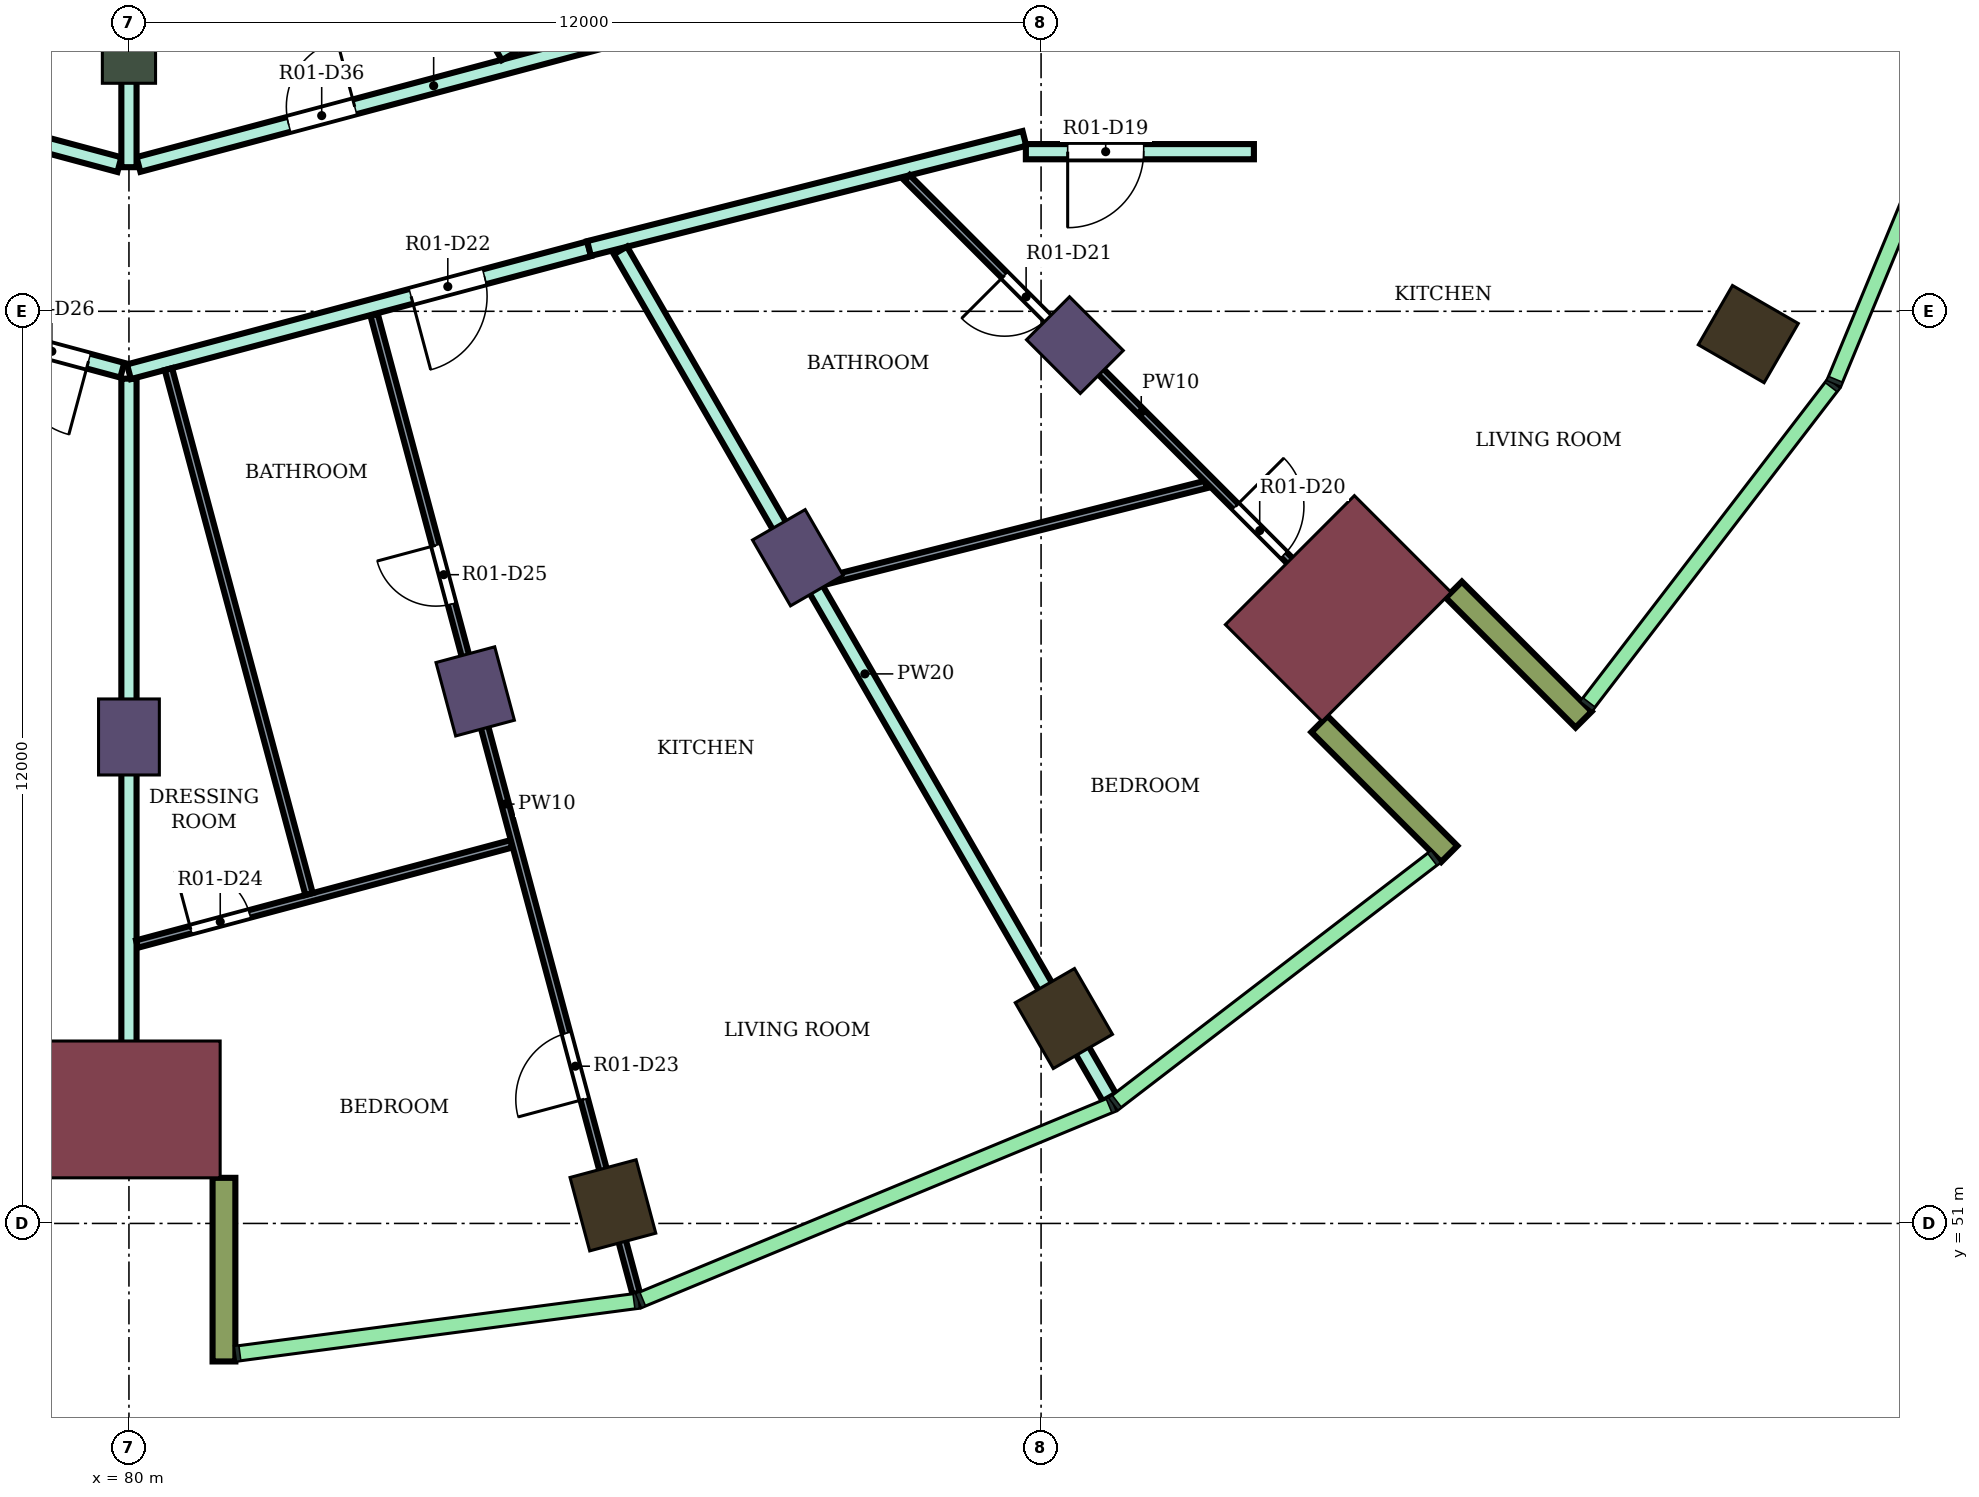
"""IFC4 building model, lengths in metres.
Left out: names, types, materials, properties, quantities, classifications, styles, units other than length and angle.
Written with IfcOpenShell. Run it as: python <this file> out.ifc"""

import sys

from ifc_helpers import new_model, si_unit, direction, frame, frame_2d, origin, origin_2d, place, context, subcontext, project, spatial, rectangle, extrude, element, fill, save


model = new_model("IFC4")
c1 = context("Model", 3, precision=1e-05, world=origin(), true_north=direction((0.0, 1.0)))
c2 = subcontext(c1, "Body", "Model", "MODEL_VIEW")
j1 = project(units=[si_unit("LENGTHUNIT", "METRE"), si_unit("PLANEANGLEUNIT", "RADIAN")], contexts=[c1])
p1 = place(None, origin())
s1 = spatial("IfcSite", under=j1, at=p1, CompositionType="ELEMENT")
p2 = place(p1, origin())
s2 = spatial("IfcBuilding", under=s1, at=p2, CompositionType="ELEMENT")
p3 = place(p2, frame((0.0, 0.0, 161.8)))
s3 = spatial("IfcBuildingStorey", under=s2, at=p3, CompositionType="ELEMENT", Elevation=161.8)
for number, where, z_axis, x_axis in (
    (1, (86.367, 51.238, 0.0), (0.0, 0.0, 1.0), (0.259, -0.966, 0.0)),
    (2, (92.3, 53.696, 0.0), (0.0, 0.0, 1.0), (0.5, -0.866, 0.0)),
    (3, (101.304, 62.7, 0.0), (0.0, 0.0, 1.0), (0.866, -0.5, 0.0)),
):
    element("IfcColumn", number, at=place(p3, frame(where, z_axis=z_axis, x_axis=x_axis)), inside=s3, PredefinedType="COLUMN", context=c2, shape_type="SweptSolid", body=[
        extrude(rectangle(XDim=1.0, YDim=0.9, at=origin_2d()), origin(), (0.0, 0.0, 1.0), 4.1),
    ])
for number, where, z_axis, x_axis in (
    (4, (80.0, 57.4, 0.0), (0.0, 0.0, 1.0), (0.0, -1.0, 0.0)),
    (5, (84.555, 58.0, 0.0), (0.0, 0.0, 1.0), (0.259, -0.966, 0.0)),
    (6, (88.8, 59.758, 0.0), (0.0, 0.0, 1.0), (0.5, -0.866, 0.0)),
    (7, (92.445, 62.555, 0.0), (0.0, 0.0, 1.0), (0.707, -0.707, 0.0)),
):
    element("IfcColumn", number, at=place(p3, frame(where, z_axis=z_axis, x_axis=x_axis)), inside=s3, PredefinedType="COLUMN", context=c2, shape_type="SweptSolid", body=[
        extrude(rectangle(XDim=1.0, YDim=0.8, at=origin_2d()), origin(), (0.0, 0.0, 1.0), 4.1),
    ])
p4 = place(p3, frame((80.0, 66.4, 0.0), z_axis=(0.0, 0.0, 1.0), x_axis=(0.0, -1.0, 0.0)))
e8 = element("IfcColumn", 8, at=p4, inside=s3, PredefinedType="COLUMN", context=c2, shape_type="SweptSolid", body=[
    extrude(rectangle(XDim=0.8, YDim=0.7, at=origin_2d()), origin(), (0.0, 0.0, 1.0), 4.1),
])
for number, where, z_axis, x_axis in (
    (9, (80.0, 52.5, 0.0), (0.0, 0.0, 1.0), (0.0, -1.0, 0.0)),
    (10, (95.91, 59.09, 0.0), (0.0, 0.0, 1.0), (0.707, -0.707, 0.0)),
):
    element("IfcColumn", number, at=place(p3, frame(where, z_axis=z_axis, x_axis=x_axis)), inside=s3, PredefinedType="COLUMN", context=c2, shape_type="SweptSolid", body=[
        extrude(rectangle(XDim=1.8, YDim=2.4, at=origin_2d()), origin(), (0.0, 0.0, 1.0), 4.1),
    ])
for number, where, z_axis, x_axis in (
    (11, (81.25, 51.6, 0.0), (0.0, 0.0, 1.0), (0.0, -1.0, 0.0)),
    (12, (95.662, 57.57, 0.0), (0.0, 0.0, 1.0), (0.707, -0.707, 0.0)),
    (13, (97.43, 59.338, 0.0), (0.0, 0.0, 1.0), (0.707, -0.707, 0.0)),
):
    element("IfcWall", number, at=place(p3, frame(where, z_axis=z_axis, x_axis=x_axis)), inside=s3, PredefinedType="NOTDEFINED", context=c2, shape_type="SweptSolid", body=[
        extrude(rectangle(XDim=2.416, YDim=0.3, at=frame_2d((1.208, 0.0))), origin(), (0.0, 0.0, 1.0), 4.1),
    ])
p5 = place(p3, frame((74.15, 63.772, 0.0), z_axis=(0.0, 0.0, 1.0), x_axis=(0.965807109237, -0.259261697417, 0.0)))
e14 = element("IfcWall", 14, at=p5, inside=s3, PredefinedType="PARTITIONING", context=c2, shape_type="SweptSolid", body=[
    extrude(rectangle(XDim=5.967, YDim=0.2, at=frame_2d((2.983, 0.0))), origin(), (0.0, 0.0, 1.0), 3.65),
])
p6 = place(p5, frame((4.507, 0.0, 0.0)))
e15 = element("IfcOpeningElement", 15, at=p6, cuts=e14, PredefinedType="OPENING", context=c2, shape_type="SweptSolid", body=[
    extrude(rectangle(XDim=1.0, YDim=2.1, at=frame_2d((0.5, 1.05))), frame((0.0, 0.11, 0.0), z_axis=(0.0, -1.0, 0.0), x_axis=(1.0, 0.0, 0.0)), (0.0, 0.0, 1.0), 0.22),
])
p7 = place(p3, frame((74.603, 66.342, 0.0), z_axis=(0.0, 0.0, 1.0), x_axis=(0.965920893652, -0.258837453254, 0.0)))
e16 = element("IfcWall", 16, at=p7, inside=s3, PredefinedType="PARTITIONING", context=c2, shape_type="SweptSolid", body=[
    extrude(rectangle(XDim=5.458, YDim=0.2, at=frame_2d((2.729, 0.0))), origin(), (0.0, 0.0, 1.0), 3.65),
])
p8 = place(p7, frame((2.512, 0.0, 0.0)))
e17 = element("IfcOpeningElement", 17, at=p8, cuts=e16, PredefinedType="OPENING", context=c2, shape_type="SweptSolid", body=[
    extrude(rectangle(XDim=0.9, YDim=2.1, at=frame_2d((0.45, 1.05))), frame((0.0, 0.11, 0.0), z_axis=(0.0, -1.0, 0.0), x_axis=(1.0, 0.0, 0.0)), (0.0, 0.0, 1.0), 0.22),
])
p9 = place(p3, frame((80.125, 64.932, 0.0), z_axis=(0.0, 0.0, 1.0), x_axis=(0.966236955806, 0.257655089674, 0.0)))
e18 = element("IfcWall", 18, at=p9, inside=s3, PredefinedType="PARTITIONING", context=c2, shape_type="SweptSolid", body=[
    extrude(rectangle(XDim=8.039, YDim=0.2, at=frame_2d((4.02, 0.0))), origin(), (0.0, 0.0, 1.0), 3.65),
])
p10 = place(p9, frame((6.298, 0.0, 0.0)))
e19 = element("IfcOpeningElement", 19, at=p10, cuts=e18, PredefinedType="OPENING", context=c2, shape_type="SweptSolid", body=[
    extrude(rectangle(XDim=0.9, YDim=2.1, at=frame_2d((0.45, 1.05))), frame((0.0, 0.11, 0.0), z_axis=(0.0, -1.0, 0.0), x_axis=(1.0, 0.0, 0.0)), (0.0, 0.0, 1.0), 0.22),
])
p11 = place(p9, frame((2.045, 0.0, 0.0)))
e20 = element("IfcOpeningElement", 20, at=p11, cuts=e18, PredefinedType="OPENING", context=c2, shape_type="SweptSolid", body=[
    extrude(rectangle(XDim=0.9, YDim=2.1, at=frame_2d((0.45, 1.05))), frame((0.0, 0.11, 0.0), z_axis=(0.0, -1.0, 0.0), x_axis=(1.0, 0.0, 0.0)), (0.0, 0.0, 1.0), 0.22),
])
p12 = place(p3, frame((80.0, 51.8, 0.0), z_axis=(0.0, 0.0, 1.0), x_axis=(0.0, 1.0, 0.0)))
e21 = element("IfcWall", 21, at=p12, inside=s3, PredefinedType="PARTITIONING", context=c2, shape_type="SweptSolid", body=[
    extrude(rectangle(XDim=10.314, YDim=0.2, at=frame_2d((5.157, 0.0))), origin(), (0.0, 0.0, 1.0), 3.65),
])
p13 = place(p3, frame((80.0, 62.205, 0.0), z_axis=(0.0, 0.0, 1.0), x_axis=(0.966104192593, 0.258152453124, 0.0)))
e22 = element("IfcWall", 22, at=p13, inside=s3, PredefinedType="PARTITIONING", context=c2, shape_type="SweptSolid", body=[
    extrude(rectangle(XDim=6.266, YDim=0.2, at=frame_2d((3.133, 0.0))), origin(), (0.0, 0.0, 1.0), 3.65),
])
p14 = place(p13, frame((3.842, 0.0, 0.0)))
e23 = element("IfcOpeningElement", 23, at=p14, cuts=e22, PredefinedType="OPENING", context=c2, shape_type="SweptSolid", body=[
    extrude(rectangle(XDim=1.0, YDim=2.1, at=frame_2d((0.5, 1.05))), frame((0.0, 0.11, 0.0), z_axis=(0.0, -1.0, 0.0), x_axis=(1.0, 0.0, 0.0)), (0.0, 0.0, 1.0), 0.22),
])
p15 = place(p3, frame((80.0, 64.896, 0.0), z_axis=(0.0, 0.0, 1.0), x_axis=(0.0, 1.0, 0.0)))
e24 = element("IfcWall", 24, at=p15, inside=s3, PredefinedType="PARTITIONING", context=c2, shape_type="SweptSolid", body=[
    extrude(rectangle(XDim=2.405, YDim=0.2, at=frame_2d((1.203, 0.0))), origin(), (0.0, 0.0, 1.0), 3.65),
])
p16 = place(p3, frame((83.85, 68.333, 0.0), z_axis=(0.0, 0.0, 1.0), x_axis=(0.499953638813, -0.866052168773, 0.0)))
e25 = element("IfcWall", 25, at=p16, inside=s3, PredefinedType="PARTITIONING", context=c2, shape_type="SweptSolid", body=[
    extrude(rectangle(XDim=2.285, YDim=0.2, at=frame_2d((1.143, 0.0))), origin(), (0.0, 0.0, 1.0), 3.65),
])
p17 = place(p3, frame((86.053, 63.826, 0.0), z_axis=(0.0, 0.0, 1.0), x_axis=(0.969490004987, 0.245130843083, 0.0)))
e26 = element("IfcWall", 26, at=p17, inside=s3, PredefinedType="PARTITIONING", context=c2, shape_type="SweptSolid", body=[
    extrude(rectangle(XDim=5.908, YDim=0.2, at=frame_2d((2.954, 0.0))), origin(), (0.0, 0.0, 1.0), 3.65),
])
p18 = place(p3, frame((86.466, 63.801, 0.0), z_axis=(0.0, 0.0, 1.0), x_axis=(0.499951314491, -0.866053510551, 0.0)))
e27 = element("IfcWall", 27, at=p18, inside=s3, PredefinedType="PARTITIONING", context=c2, shape_type="SweptSolid", body=[
    extrude(rectangle(XDim=12.866, YDim=0.2, at=frame_2d((6.433, 0.0))), origin(), (0.0, 0.0, 1.0), 3.65),
])
p19 = place(p3, frame((91.8, 65.1, 0.0), z_axis=(0.0, 0.0, 1.0), x_axis=(1.0, 0.0, 0.0)))
e28 = element("IfcWall", 28, at=p19, inside=s3, PredefinedType="PARTITIONING", context=c2, shape_type="SweptSolid", body=[
    extrude(rectangle(XDim=3.0, YDim=0.2, at=frame_2d((1.5, 0.0))), origin(), (0.0, 0.0, 1.0), 3.65),
])
p20 = place(p19, frame((0.55, 0.0, 0.0)))
e29 = element("IfcOpeningElement", 29, at=p20, cuts=e28, PredefinedType="OPENING", context=c2, shape_type="SweptSolid", body=[
    extrude(rectangle(XDim=1.0, YDim=2.1, at=frame_2d((0.5, 1.05))), frame((0.0, 0.11, 0.0), z_axis=(0.0, -1.0, 0.0), x_axis=(1.0, 0.0, 0.0)), (0.0, 0.0, 1.0), 0.22),
])
p21 = place(p3, frame((80.106, 54.676, 0.0), z_axis=(0.0, 0.0, 1.0), x_axis=(0.965976901679, 0.258628353863, 0.0)))
e30 = element("IfcWall", 30, at=p21, inside=s3, PredefinedType="PARTITIONING", context=c2, shape_type="SweptSolid", body=[
    extrude(rectangle(XDim=5.097, YDim=0.1, at=frame_2d((2.549, 0.0))), origin(), (0.0, 0.0, 1.0), 3.65),
])
p22 = place(p21, frame((0.733, 0.0, 0.0)))
e31 = element("IfcOpeningElement", 31, at=p22, cuts=e30, PredefinedType="OPENING", context=c2, shape_type="SweptSolid", body=[
    extrude(rectangle(XDim=0.8, YDim=2.1, at=frame_2d((0.4, 1.05))), frame((0.0, 0.06, 0.0), z_axis=(0.0, -1.0, 0.0), x_axis=(1.0, 0.0, 0.0)), (0.0, 0.0, 1.0), 0.12),
])
p23 = place(p3, frame((80.519, 62.239, 0.0), z_axis=(0.0, 0.0, 1.0), x_axis=(0.25878046533, -0.965936162882, 0.0)))
e32 = element("IfcWall", 32, at=p23, inside=s3, PredefinedType="PARTITIONING", context=c2, shape_type="SweptSolid", body=[
    extrude(rectangle(XDim=7.149, YDim=0.1, at=frame_2d((3.575, 0.0))), origin(), (0.0, 0.0, 1.0), 3.65),
])
p24 = place(p3, frame((83.225, 62.954, 0.0), z_axis=(0.0, 0.0, 1.0), x_axis=(0.258715941946, -0.965953446799, 0.0)))
e33 = element("IfcWall", 33, at=p24, inside=s3, PredefinedType="PARTITIONING", context=c2, shape_type="SweptSolid", body=[
    extrude(rectangle(XDim=13.328, YDim=0.1, at=frame_2d((6.664, 0.0))), origin(), (0.0, 0.0, 1.0), 3.65),
])
p25 = place(p24, frame((9.784, 0.0, 0.0)))
e34 = element("IfcOpeningElement", 34, at=p25, cuts=e33, PredefinedType="OPENING", context=c2, shape_type="SweptSolid", body=[
    extrude(rectangle(XDim=0.9, YDim=2.1, at=frame_2d((0.45, 1.05))), frame((0.0, 0.06, 0.0), z_axis=(0.0, -1.0, 0.0), x_axis=(1.0, 0.0, 0.0)), (0.0, 0.0, 1.0), 0.12),
])
p26 = place(p24, frame((3.14, 0.0, 0.0)))
e35 = element("IfcOpeningElement", 35, at=p26, cuts=e33, PredefinedType="OPENING", context=c2, shape_type="SweptSolid", body=[
    extrude(rectangle(XDim=0.8, YDim=2.1, at=frame_2d((0.4, 1.05))), frame((0.0, 0.06, 0.0), z_axis=(0.0, -1.0, 0.0), x_axis=(1.0, 0.0, 0.0)), (0.0, 0.0, 1.0), 0.12),
])
p27 = place(p3, frame((89.106, 59.441, 0.0), z_axis=(0.0, 0.0, 1.0), x_axis=(0.969462385749, 0.245240051009, 0.0)))
e36 = element("IfcWall", 36, at=p27, inside=s3, PredefinedType="PARTITIONING", context=c2, shape_type="SweptSolid", body=[
    extrude(rectangle(XDim=5.223, YDim=0.1, at=frame_2d((2.612, 0.0))), origin(), (0.0, 0.0, 1.0), 3.65),
])
p28 = place(p3, frame((90.236, 64.758, 0.0), z_axis=(0.0, 0.0, 1.0), x_axis=(0.706938769128, -0.707274753334, 0.0)))
e37 = element("IfcWall", 37, at=p28, inside=s3, PredefinedType="PARTITIONING", context=c2, shape_type="SweptSolid", body=[
    extrude(rectangle(XDim=8.72, YDim=0.1, at=frame_2d((4.36, 0.0))), origin(), (0.0, 0.0, 1.0), 3.65),
])
p29 = place(p28, frame((6.115, 0.0, 0.0)))
e38 = element("IfcOpeningElement", 38, at=p29, cuts=e37, PredefinedType="OPENING", context=c2, shape_type="SweptSolid", body=[
    extrude(rectangle(XDim=0.9, YDim=2.1, at=frame_2d((0.45, 1.05))), frame((0.0, 0.06, 0.0), z_axis=(0.0, -1.0, 0.0), x_axis=(1.0, 0.0, 0.0)), (0.0, 0.0, 1.0), 0.12),
])
p30 = place(p28, frame((1.817, 0.0, 0.0)))
e39 = element("IfcOpeningElement", 39, at=p30, cuts=e37, PredefinedType="OPENING", context=c2, shape_type="SweptSolid", body=[
    extrude(rectangle(XDim=0.8, YDim=2.1, at=frame_2d((0.4, 1.05))), frame((0.0, 0.06, 0.0), z_axis=(0.0, -1.0, 0.0), x_axis=(1.0, 0.0, 0.0)), (0.0, 0.0, 1.0), 0.12),
])
p31 = place(p20, frame((1.0, 0.0, 0.0), z_axis=(0.0, 0.0, 1.0), x_axis=(-1.0, 0.0, 0.0)))
e40 = element("IfcDoor", 40, at=p31, inside=s3, OperationType="SINGLE_SWING_RIGHT", PredefinedType="DOOR", context=c2, shape_type="SweptSolid", body=[
    extrude(rectangle(XDim=1.0, YDim=2.1, at=frame_2d((0.5, 1.05))), frame((0.0, 0.025, 0.0), z_axis=(0.0, -1.0, 0.0), x_axis=(1.0, 0.0, 0.0)), (0.0, 0.0, 1.0), 0.05),
])
fill(e29, e40)
p32 = place(p29, origin())
e41 = element("IfcDoor", 41, at=p32, inside=s3, OperationType="SINGLE_SWING_LEFT", PredefinedType="DOOR", context=c2, shape_type="SweptSolid", body=[
    extrude(rectangle(XDim=0.9, YDim=2.1, at=frame_2d((0.45, 1.05))), frame((0.0, 0.025, 0.0), z_axis=(0.0, -1.0, 0.0), x_axis=(1.0, 0.0, 0.0)), (0.0, 0.0, 1.0), 0.05),
])
fill(e38, e41)
p33 = place(p30, frame((0.8, 0.0, 0.0), z_axis=(0.0, 0.0, 1.0), x_axis=(-1.0, 0.0, 0.0)))
e42 = element("IfcDoor", 42, at=p33, inside=s3, OperationType="SINGLE_SWING_RIGHT", PredefinedType="DOOR", context=c2, shape_type="SweptSolid", body=[
    extrude(rectangle(XDim=0.8, YDim=2.1, at=frame_2d((0.4, 1.05))), frame((0.0, 0.025, 0.0), z_axis=(0.0, -1.0, 0.0), x_axis=(1.0, 0.0, 0.0)), (0.0, 0.0, 1.0), 0.05),
])
fill(e39, e42)
p34 = place(p14, frame((1.0, 0.0, 0.0), z_axis=(0.0, 0.0, 1.0), x_axis=(-1.0, 0.0, 0.0)))
e43 = element("IfcDoor", 43, at=p34, inside=s3, OperationType="SINGLE_SWING_RIGHT", PredefinedType="DOOR", context=c2, shape_type="SweptSolid", body=[
    extrude(rectangle(XDim=1.0, YDim=2.1, at=frame_2d((0.5, 1.05))), frame((0.0, 0.025, 0.0), z_axis=(0.0, -1.0, 0.0), x_axis=(1.0, 0.0, 0.0)), (0.0, 0.0, 1.0), 0.05),
])
fill(e23, e43)
p35 = place(p25, frame((0.9, 0.0, 0.0), z_axis=(0.0, 0.0, 1.0), x_axis=(-1.0, 0.0, 0.0)))
e44 = element("IfcDoor", 44, at=p35, inside=s3, OperationType="SINGLE_SWING_LEFT", PredefinedType="DOOR", context=c2, shape_type="SweptSolid", body=[
    extrude(rectangle(XDim=0.9, YDim=2.1, at=frame_2d((0.45, 1.05))), frame((0.0, 0.025, 0.0), z_axis=(0.0, -1.0, 0.0), x_axis=(1.0, 0.0, 0.0)), (0.0, 0.0, 1.0), 0.05),
])
fill(e34, e44)
p36 = place(p22, origin())
e45 = element("IfcDoor", 45, at=p36, inside=s3, OperationType="SINGLE_SWING_LEFT", PredefinedType="DOOR", context=c2, shape_type="SweptSolid", body=[
    extrude(rectangle(XDim=0.8, YDim=2.1, at=frame_2d((0.4, 1.05))), frame((0.0, 0.025, 0.0), z_axis=(0.0, -1.0, 0.0), x_axis=(1.0, 0.0, 0.0)), (0.0, 0.0, 1.0), 0.05),
])
fill(e31, e45)
p37 = place(p26, frame((0.8, 0.0, 0.0), z_axis=(0.0, 0.0, 1.0), x_axis=(-1.0, 0.0, 0.0)))
e46 = element("IfcDoor", 46, at=p37, inside=s3, OperationType="SINGLE_SWING_RIGHT", PredefinedType="DOOR", context=c2, shape_type="SweptSolid", body=[
    extrude(rectangle(XDim=0.8, YDim=2.1, at=frame_2d((0.4, 1.05))), frame((0.0, 0.025, 0.0), z_axis=(0.0, -1.0, 0.0), x_axis=(1.0, 0.0, 0.0)), (0.0, 0.0, 1.0), 0.05),
])
fill(e35, e46)
p38 = place(p6, frame((1.0, 0.0, 0.0), z_axis=(0.0, 0.0, 1.0), x_axis=(-1.0, 0.0, 0.0)))
e47 = element("IfcDoor", 47, at=p38, inside=s3, OperationType="SINGLE_SWING_LEFT", PredefinedType="DOOR", context=c2, shape_type="SweptSolid", body=[
    extrude(rectangle(XDim=1.0, YDim=2.1, at=frame_2d((0.5, 1.05))), frame((0.0, 0.025, 0.0), z_axis=(0.0, -1.0, 0.0), x_axis=(1.0, 0.0, 0.0)), (0.0, 0.0, 1.0), 0.05),
])
fill(e15, e47)
p39 = place(p11, origin())
e48 = element("IfcDoor", 48, at=p39, inside=s3, OperationType="SINGLE_SWING_RIGHT", PredefinedType="DOOR", context=c2, shape_type="SweptSolid", body=[
    extrude(rectangle(XDim=0.9, YDim=2.1, at=frame_2d((0.45, 1.05))), frame((0.0, 0.025, 0.0), z_axis=(0.0, -1.0, 0.0), x_axis=(1.0, 0.0, 0.0)), (0.0, 0.0, 1.0), 0.05),
])
fill(e20, e48)
save(model, sys.argv[1])
